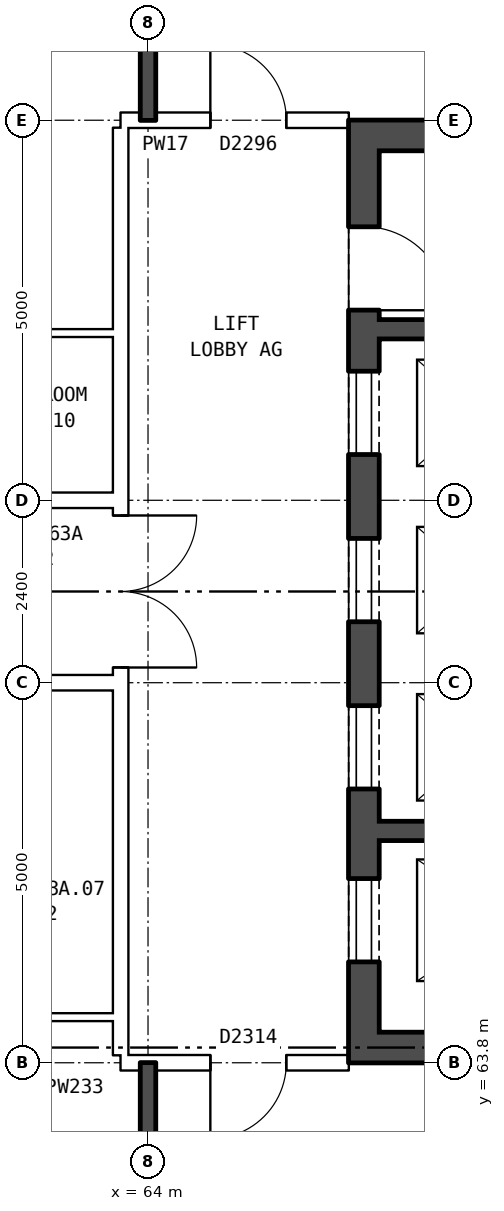
"""IFC4 building model, lengths in metres.
Left out: names, types, materials, properties, quantities, classifications, styles, units other than length and angle.
Written with IfcOpenShell. Run it as: python <this file> out.ifc"""

import sys

from ifc_helpers import new_model, si_unit, direction, frame, frame_2d, origin, place, context, subcontext, project, spatial, rectangle, extrude, element, fill, save


model = new_model("IFC4")
c1 = context("Model", 3, precision=1e-05, world=origin(), true_north=direction((0.0, 1.0)))
c2 = subcontext(c1, "Body", "Model", "MODEL_VIEW")
j1 = project(units=[si_unit("LENGTHUNIT", "METRE"), si_unit("PLANEANGLEUNIT", "RADIAN")], contexts=[c1])
p1 = place(None, origin())
s1 = spatial("IfcSite", under=j1, at=p1, CompositionType="ELEMENT")
p2 = place(p1, origin())
s2 = spatial("IfcBuilding", under=s1, at=p2, CompositionType="ELEMENT")
p3 = place(p2, frame((0.0, 0.0, 224.5)))
s3 = spatial("IfcBuildingStorey", under=s2, at=p3, CompositionType="ELEMENT", Elevation=224.5)
p4 = place(p3, frame((66.84, 63.8, 0.0), z_axis=(0.0, 0.0, 1.0), x_axis=(0.0, 1.0, 0.0)))
e1 = element("IfcWall", 1, at=p4, inside=s3, PredefinedType="SHEAR", context=c2, shape_type="SweptSolid", body=[
    extrude(rectangle(XDim=12.4, YDim=0.4, at=frame_2d((6.2, 0.0))), origin(), (0.0, 0.0, 1.0), 2.85),
])
p5 = place(p4, frame((1.325, 0.0, 0.0)))
e2 = element("IfcOpeningElement", 2, at=p5, cuts=e1, PredefinedType="OPENING", context=c2, shape_type="SweptSolid", body=[
    extrude(rectangle(XDim=1.1, YDim=2.1, at=frame_2d((0.55, 1.05))), frame((0.0, 0.21, 0.0), z_axis=(0.0, -1.0, 0.0), x_axis=(1.0, 0.0, 0.0)), (0.0, 0.0, 1.0), 0.42),
])
p6 = place(p4, frame((3.6, 0.0, 0.0)))
e3 = element("IfcOpeningElement", 3, at=p6, cuts=e1, PredefinedType="OPENING", context=c2, shape_type="SweptSolid", body=[
    extrude(rectangle(XDim=1.1, YDim=2.1, at=frame_2d((0.55, 1.05))), frame((0.0, 0.21, 0.0), z_axis=(0.0, -1.0, 0.0), x_axis=(1.0, 0.0, 0.0)), (0.0, 0.0, 1.0), 0.42),
])
p7 = place(p4, frame((5.8, 0.0, 0.0)))
e4 = element("IfcOpeningElement", 4, at=p7, cuts=e1, PredefinedType="OPENING", context=c2, shape_type="SweptSolid", body=[
    extrude(rectangle(XDim=1.1, YDim=2.1, at=frame_2d((0.55, 1.05))), frame((0.0, 0.21, 0.0), z_axis=(0.0, -1.0, 0.0), x_axis=(1.0, 0.0, 0.0)), (0.0, 0.0, 1.0), 0.42),
])
p8 = place(p4, frame((8.0, 0.0, 0.0)))
e5 = element("IfcOpeningElement", 5, at=p8, cuts=e1, PredefinedType="OPENING", context=c2, shape_type="SweptSolid", body=[
    extrude(rectangle(XDim=1.1, YDim=2.1, at=frame_2d((0.55, 1.05))), frame((0.0, 0.21, 0.0), z_axis=(0.0, -1.0, 0.0), x_axis=(1.0, 0.0, 0.0)), (0.0, 0.0, 1.0), 0.42),
])
p9 = place(p4, frame((9.9, 0.0, 0.0)))
e6 = element("IfcOpeningElement", 6, at=p9, cuts=e1, PredefinedType="OPENING", context=c2, shape_type="SweptSolid", body=[
    extrude(rectangle(XDim=1.1, YDim=2.1, at=frame_2d((0.55, 1.05))), frame((0.0, 0.21, 0.0), z_axis=(0.0, -1.0, 0.0), x_axis=(1.0, 0.0, 0.0)), (0.0, 0.0, 1.0), 0.42),
])
for number, where, z_axis, x_axis in (
    (7, (67.04, 64.0, 0.0), (0.0, 0.0, 1.0), (1.0, 0.0, 0.0)),
    (8, (67.04, 76.0, 0.0), (0.0, 0.0, 1.0), (1.0, 0.0, 0.0)),
):
    element("IfcWall", number, at=place(p3, frame(where, z_axis=z_axis, x_axis=x_axis)), inside=s3, PredefinedType="SHEAR", context=c2, shape_type="SweptSolid", body=[
        extrude(rectangle(XDim=8.2, YDim=0.4, at=frame_2d((4.1, 0.0))), origin(), (0.0, 0.0, 1.0), 2.85),
    ])
p10 = place(p3, frame((67.04, 66.85, 0.0), z_axis=(0.0, 0.0, 1.0), x_axis=(1.0, 0.0, 0.0)))
e9 = element("IfcWall", 9, at=p10, inside=s3, PredefinedType="SHEAR", context=c2, shape_type="SweptSolid", body=[
    extrude(rectangle(XDim=3.595, YDim=0.25, at=frame_2d((1.797, 0.0))), origin(), (0.0, 0.0, 1.0), 2.85),
])
p11 = place(p3, frame((67.04, 73.45, 0.0), z_axis=(0.0, 0.0, 1.0), x_axis=(1.0, 0.0, 0.0)))
e10 = element("IfcWall", 10, at=p11, inside=s3, PredefinedType="SHEAR", context=c2, shape_type="SweptSolid", body=[
    extrude(rectangle(XDim=2.525, YDim=0.25, at=frame_2d((1.262, 0.0))), origin(), (0.0, 0.0, 1.0), 2.85),
])
p12 = place(p3, frame((63.64, 63.9, 0.0), z_axis=(0.0, 0.0, 1.0), x_axis=(0.0, 1.0, 0.0)))
e11 = element("IfcWall", 11, at=p12, inside=s3, PredefinedType="PARTITIONING", context=c2, shape_type="SweptSolid", body=[
    extrude(rectangle(XDim=12.2, YDim=0.2, at=frame_2d((6.1, 0.0))), origin(), (0.0, 0.0, 1.0), 2.85),
])
p13 = place(p12, frame((5.1, 0.0, 0.0)))
e12 = element("IfcOpeningElement", 12, at=p13, cuts=e11, PredefinedType="OPENING", context=c2, shape_type="SweptSolid", body=[
    extrude(rectangle(XDim=2.0, YDim=2.1, at=frame_2d((1.0, 1.05))), frame((0.0, 0.11, 0.0), z_axis=(0.0, -1.0, 0.0), x_axis=(1.0, 0.0, 0.0)), (0.0, 0.0, 1.0), 0.22),
])
p14 = place(p3, frame((63.64, 63.8, 0.0), z_axis=(0.0, 0.0, 1.0), x_axis=(1.0, 0.0, 0.0)))
e13 = element("IfcWall", 13, at=p14, inside=s3, PredefinedType="PARTITIONING", context=c2, shape_type="SweptSolid", body=[
    extrude(rectangle(XDim=3.0, YDim=0.2, at=frame_2d((1.5, 0.0))), origin(), (0.0, 0.0, 1.0), 2.85),
])
p15 = place(p14, frame((1.18, 0.0, 0.0)))
e14 = element("IfcOpeningElement", 14, at=p15, cuts=e13, PredefinedType="OPENING", context=c2, shape_type="SweptSolid", body=[
    extrude(rectangle(XDim=1.0, YDim=2.1, at=frame_2d((0.5, 1.05))), frame((0.0, 0.11, 0.0), z_axis=(0.0, -1.0, 0.0), x_axis=(1.0, 0.0, 0.0)), (0.0, 0.0, 1.0), 0.22),
])
p16 = place(p3, frame((61.0, 64.4, 0.0), z_axis=(0.0, 0.0, 1.0), x_axis=(1.0, 0.0, 0.0)))
e15 = element("IfcWall", 15, at=p16, inside=s3, PredefinedType="PARTITIONING", context=c2, shape_type="SweptSolid", body=[
    extrude(rectangle(XDim=2.64, YDim=0.1, at=frame_2d((1.32, 0.0))), origin(), (0.0, 0.0, 1.0), 2.85),
])
p17 = place(p3, frame((44.36, 68.8, 0.0), z_axis=(0.0, 0.0, 1.0), x_axis=(1.0, 0.0, 0.0)))
e16 = element("IfcWall", 16, at=p17, inside=s3, PredefinedType="PARTITIONING", context=c2, shape_type="SweptSolid", body=[
    extrude(rectangle(XDim=19.28, YDim=0.2, at=frame_2d((9.64, 0.0))), origin(), (0.0, 0.0, 1.0), 2.85),
])
p18 = place(p17, frame((14.64, 0.0, 0.0)))
e17 = element("IfcOpeningElement", 17, at=p18, cuts=e16, PredefinedType="OPENING", context=c2, shape_type="SweptSolid", body=[
    extrude(rectangle(XDim=1.0, YDim=2.1, at=frame_2d((0.5, 1.05))), frame((0.0, 0.11, 0.0), z_axis=(0.0, -1.0, 0.0), x_axis=(1.0, 0.0, 0.0)), (0.0, 0.0, 1.0), 0.22),
])
p19 = place(p17, frame((8.64, 0.0, 0.0)))
e18 = element("IfcOpeningElement", 18, at=p19, cuts=e16, PredefinedType="OPENING", context=c2, shape_type="SweptSolid", body=[
    extrude(rectangle(XDim=1.0, YDim=2.1, at=frame_2d((0.5, 1.05))), frame((0.0, 0.11, 0.0), z_axis=(0.0, -1.0, 0.0), x_axis=(1.0, 0.0, 0.0)), (0.0, 0.0, 1.0), 0.22),
])
p20 = place(p17, frame((5.64, 0.0, 0.0)))
e19 = element("IfcOpeningElement", 19, at=p20, cuts=e16, PredefinedType="OPENING", context=c2, shape_type="SweptSolid", body=[
    extrude(rectangle(XDim=1.0, YDim=2.1, at=frame_2d((0.5, 1.05))), frame((0.0, 0.11, 0.0), z_axis=(0.0, -1.0, 0.0), x_axis=(1.0, 0.0, 0.0)), (0.0, 0.0, 1.0), 0.22),
])
p21 = place(p3, frame((44.36, 71.2, 0.0), z_axis=(0.0, 0.0, 1.0), x_axis=(1.0, 0.0, 0.0)))
e20 = element("IfcWall", 20, at=p21, inside=s3, PredefinedType="PARTITIONING", context=c2, shape_type="SweptSolid", body=[
    extrude(rectangle(XDim=19.28, YDim=0.2, at=frame_2d((9.64, 0.0))), origin(), (0.0, 0.0, 1.0), 2.85),
])
p22 = place(p21, frame((14.64, 0.0, 0.0)))
e21 = element("IfcOpeningElement", 21, at=p22, cuts=e20, PredefinedType="OPENING", context=c2, shape_type="SweptSolid", body=[
    extrude(rectangle(XDim=1.0, YDim=2.1, at=frame_2d((0.5, 1.05))), frame((0.0, 0.11, 0.0), z_axis=(0.0, -1.0, 0.0), x_axis=(1.0, 0.0, 0.0)), (0.0, 0.0, 1.0), 0.22),
])
p23 = place(p21, frame((5.64, 0.0, 0.0)))
e22 = element("IfcOpeningElement", 22, at=p23, cuts=e20, PredefinedType="OPENING", context=c2, shape_type="SweptSolid", body=[
    extrude(rectangle(XDim=1.0, YDim=2.1, at=frame_2d((0.5, 1.05))), frame((0.0, 0.11, 0.0), z_axis=(0.0, -1.0, 0.0), x_axis=(1.0, 0.0, 0.0)), (0.0, 0.0, 1.0), 0.22),
])
p24 = place(p3, frame((61.0, 73.4, 0.0), z_axis=(0.0, 0.0, 1.0), x_axis=(1.0, 0.0, 0.0)))
e23 = element("IfcWall", 23, at=p24, inside=s3, PredefinedType="PARTITIONING", context=c2, shape_type="SweptSolid", body=[
    extrude(rectangle(XDim=2.64, YDim=0.1, at=frame_2d((1.32, 0.0))), origin(), (0.0, 0.0, 1.0), 2.85),
])
p25 = place(p3, frame((63.64, 76.2, 0.0), z_axis=(0.0, 0.0, 1.0), x_axis=(1.0, 0.0, 0.0)))
e24 = element("IfcWall", 24, at=p25, inside=s3, PredefinedType="PARTITIONING", context=c2, shape_type="SweptSolid", body=[
    extrude(rectangle(XDim=3.0, YDim=0.2, at=frame_2d((1.5, 0.0))), origin(), (0.0, 0.0, 1.0), 2.85),
])
p26 = place(p25, frame((1.18, 0.0, 0.0)))
e25 = element("IfcOpeningElement", 25, at=p26, cuts=e24, PredefinedType="OPENING", context=c2, shape_type="SweptSolid", body=[
    extrude(rectangle(XDim=1.0, YDim=2.1, at=frame_2d((0.5, 1.05))), frame((0.0, 0.11, 0.0), z_axis=(0.0, -1.0, 0.0), x_axis=(1.0, 0.0, 0.0)), (0.0, 0.0, 1.0), 0.22),
])
for number, where, z_axis, x_axis in (
    (26, (64.0, 54.36, 0.0), (0.0, 0.0, 1.0), (0.0, 1.0, 0.0)),
    (27, (64.0, 76.2, 0.0), (0.0, 0.0, 1.0), (0.0, 1.0, 0.0)),
):
    element("IfcWall", number, at=place(p3, frame(where, z_axis=z_axis, x_axis=x_axis)), inside=s3, PredefinedType="SOLIDWALL", context=c2, shape_type="SweptSolid", body=[
        extrude(rectangle(XDim=9.44, YDim=0.2, at=frame_2d((4.72, 0.0))), origin(), (0.0, 0.0, 1.0), 2.85),
    ])
p27 = place(p5, origin())
e28 = element("IfcDoor", 28, at=p27, inside=s3, OperationType="DOUBLE_DOOR_SLIDING", PredefinedType="DOOR", context=c2, shape_type="SweptSolid", body=[
    extrude(rectangle(XDim=1.1, YDim=2.1, at=frame_2d((0.55, 1.05))), frame((0.0, -0.135, 0.0), z_axis=(0.0, -1.0, 0.0), x_axis=(1.0, 0.0, 0.0)), (0.0, 0.0, 1.0), 0.05),
])
fill(e2, e28)
p28 = place(p6, origin())
e29 = element("IfcDoor", 29, at=p28, inside=s3, OperationType="DOUBLE_DOOR_SLIDING", PredefinedType="DOOR", context=c2, shape_type="SweptSolid", body=[
    extrude(rectangle(XDim=1.1, YDim=2.1, at=frame_2d((0.55, 1.05))), frame((0.0, -0.135, 0.0), z_axis=(0.0, -1.0, 0.0), x_axis=(1.0, 0.0, 0.0)), (0.0, 0.0, 1.0), 0.05),
])
fill(e3, e29)
p29 = place(p7, origin())
e30 = element("IfcDoor", 30, at=p29, inside=s3, OperationType="DOUBLE_DOOR_SLIDING", PredefinedType="DOOR", context=c2, shape_type="SweptSolid", body=[
    extrude(rectangle(XDim=1.1, YDim=2.1, at=frame_2d((0.55, 1.05))), frame((0.0, -0.135, 0.0), z_axis=(0.0, -1.0, 0.0), x_axis=(1.0, 0.0, 0.0)), (0.0, 0.0, 1.0), 0.05),
])
fill(e4, e30)
p30 = place(p8, origin())
e31 = element("IfcDoor", 31, at=p30, inside=s3, OperationType="DOUBLE_DOOR_SLIDING", PredefinedType="DOOR", context=c2, shape_type="SweptSolid", body=[
    extrude(rectangle(XDim=1.1, YDim=2.1, at=frame_2d((0.55, 1.05))), frame((0.0, -0.135, 0.0), z_axis=(0.0, -1.0, 0.0), x_axis=(1.0, 0.0, 0.0)), (0.0, 0.0, 1.0), 0.05),
])
fill(e5, e31)
p31 = place(p9, frame((1.1, 0.0, 0.0), z_axis=(0.0, 0.0, 1.0), x_axis=(-1.0, 0.0, 0.0)))
e32 = element("IfcDoor", 32, at=p31, inside=s3, OperationType="SINGLE_SWING_RIGHT", PredefinedType="DOOR", context=c2, shape_type="SweptSolid", body=[
    extrude(rectangle(XDim=1.1, YDim=2.1, at=frame_2d((0.55, 1.05))), frame((0.0, 0.185, 0.0), z_axis=(0.0, -1.0, 0.0), x_axis=(1.0, 0.0, 0.0)), (0.0, 0.0, 1.0), 0.05),
])
fill(e6, e32)
p32 = place(p13, frame((2.0, 0.0, 0.0), z_axis=(0.0, 0.0, 1.0), x_axis=(-1.0, 0.0, 0.0)))
e33 = element("IfcDoor", 33, at=p32, inside=s3, OperationType="DOUBLE_DOOR_SINGLE_SWING", PredefinedType="DOOR", context=c2, shape_type="SweptSolid", body=[
    extrude(rectangle(XDim=2.0, YDim=2.1, at=frame_2d((1.0, 1.05))), frame((0.0, 0.025, 0.0), z_axis=(0.0, -1.0, 0.0), x_axis=(1.0, 0.0, 0.0)), (0.0, 0.0, 1.0), 0.05),
])
fill(e12, e33)
p33 = place(p15, frame((1.0, 0.0, 0.0), z_axis=(0.0, 0.0, 1.0), x_axis=(-1.0, 0.0, 0.0)))
e34 = element("IfcDoor", 34, at=p33, inside=s3, OperationType="SINGLE_SWING_RIGHT", PredefinedType="DOOR", context=c2, shape_type="SweptSolid", body=[
    extrude(rectangle(XDim=1.0, YDim=2.1, at=frame_2d((0.5, 1.05))), frame((0.0, 0.025, 0.0), z_axis=(0.0, -1.0, 0.0), x_axis=(1.0, 0.0, 0.0)), (0.0, 0.0, 1.0), 0.05),
])
fill(e14, e34)
p34 = place(p26, origin())
e35 = element("IfcDoor", 35, at=p34, inside=s3, OperationType="SINGLE_SWING_LEFT", PredefinedType="DOOR", context=c2, shape_type="SweptSolid", body=[
    extrude(rectangle(XDim=1.0, YDim=2.1, at=frame_2d((0.5, 1.05))), frame((0.0, 0.025, 0.0), z_axis=(0.0, -1.0, 0.0), x_axis=(1.0, 0.0, 0.0)), (0.0, 0.0, 1.0), 0.05),
])
fill(e25, e35)
save(model, sys.argv[1])
